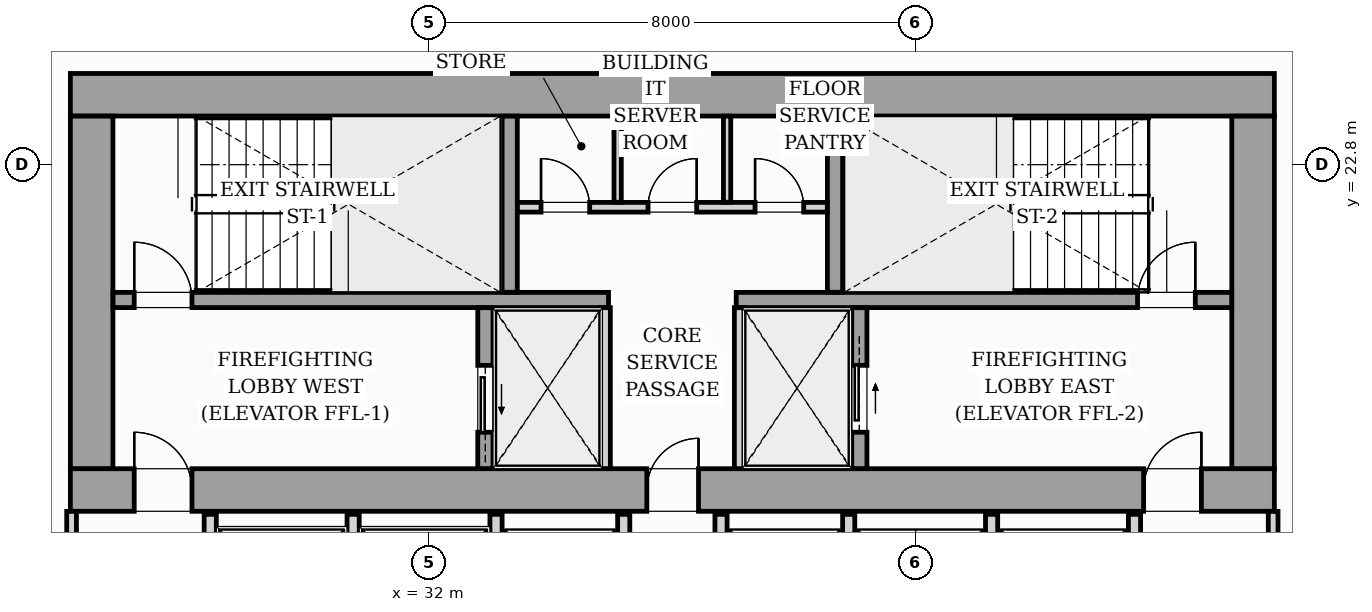
"""IFC4 building model, lengths in metres.
Left out: names, types, materials, properties, quantities, classifications, styles, units other than length and angle.
Written with IfcOpenShell. Run it as: python <this file> out.ifc"""

import sys

from ifc_helpers import new_model, si_unit, direction, frame, frame_2d, origin, origin_2d, place, context, subcontext, project, spatial, rectangle, i_section, extrude, source, transform, mapped, element, fill, save


model = new_model("IFC4")
c1 = context("Model", 3, precision=1e-05, world=origin(), true_north=direction((0.0, 1.0)))
c2 = subcontext(c1, "Body", "Model", "MODEL_VIEW")
j1 = project(units=[si_unit("LENGTHUNIT", "METRE"), si_unit("PLANEANGLEUNIT", "RADIAN")], contexts=[c1])
p1 = place(None, origin())
s1 = spatial("IfcSite", under=j1, at=p1, CompositionType="ELEMENT")
p2 = place(p1, origin())
s2 = spatial("IfcBuilding", under=s1, at=p2, CompositionType="ELEMENT")
p3 = place(p2, frame((0.0, 0.0, 84.2)))
s3 = spatial("IfcBuildingStorey", under=s2, at=p3, CompositionType="ELEMENT", Elevation=84.2)
m1 = source(origin(), c2, "Body", "SweptSolid", [
    extrude(i_section(OverallWidth=0.427, OverallDepth=0.483, WebThickness=0.051, FlangeThickness=0.082, FilletRadius=0.018, at=origin_2d()), origin(), (0.0, 0.0, 1.0), 3.196),
])
for number, where, z_axis, x_axis in (
    (1, (26.4, 17.4, 0.002), (0.0, 0.0, 1.0), (1.0, 0.0, 0.0)),
    (2, (33.12, 17.4, 0.002), (0.0, 0.0, 1.0), (1.0, 0.0, 0.0)),
    (3, (38.88, 17.4, 0.002), (0.0, 0.0, 1.0), (1.0, 0.0, 0.0)),
    (4, (45.6, 17.4, 0.002), (0.0, 0.0, 1.0), (1.0, 0.0, 0.0)),
    (5, (26.4, 24.0, 0.002), (0.0, 0.0, 1.0), (1.0, 0.0, 0.0)),
    (6, (33.12, 24.0, 0.002), (0.0, 0.0, 1.0), (1.0, 0.0, 0.0)),
    (7, (38.88, 24.0, 0.002), (0.0, 0.0, 1.0), (1.0, 0.0, 0.0)),
    (8, (45.6, 24.0, 0.002), (0.0, 0.0, 1.0), (1.0, 0.0, 0.0)),
):
    element("IfcColumn", number, at=place(p3, frame(where, z_axis=z_axis, x_axis=x_axis)), inside=s3, PredefinedType="PILASTER", context=c2, shape_type="MappedRepresentation", body=[
        mapped(m1, transform((0.0, 0.0, 0.0), scale=1.0)),
    ])
p4 = place(p3, frame((11.08, 23.508, 0.0), z_axis=(0.0, 0.0, 1.0), x_axis=(0.995396638587, 0.095841180552, 0.0)))
e9 = element("IfcWall", 9, at=p4, inside=s3, PredefinedType="STANDARD", context=c2, shape_type="SweptSolid", body=[
    extrude(rectangle(XDim=19.11, YDim=0.26, at=frame_2d((9.555, 0.0))), origin(), (0.0, 0.0, 1.0), 2.94),
])
p5 = place(p4, frame((7.824, 0.0, 0.0)))
e10 = element("IfcOpeningElement", 10, at=p5, cuts=e9, PredefinedType="OPENING", context=c2, shape_type="SweptSolid", body=[
    extrude(rectangle(XDim=1.8, YDim=2.06, at=frame_2d((0.9, 1.03))), frame((0.0, 0.14, 0.0), z_axis=(0.0, -1.0, 0.0), x_axis=(1.0, 0.0, 0.0)), (0.0, 0.0, 1.0), 0.28),
])
p6 = place(p4, frame((2.05, 0.0, 0.65)))
e11 = element("IfcOpeningElement", 11, at=p6, cuts=e9, PredefinedType="OPENING", context=c2, shape_type="SweptSolid", body=[
    extrude(rectangle(XDim=1.6, YDim=1.5, at=frame_2d((0.8, 0.75))), frame((0.0, 0.14, 0.0), z_axis=(0.0, -1.0, 0.0), x_axis=(1.0, 0.0, 0.0)), (0.0, 0.0, 1.0), 0.28),
])
p7 = place(p3, frame((26.1, 17.45, 0.0), z_axis=(0.0, 0.0, 1.0), x_axis=(1.0, 0.0, 0.0)))
e12 = element("IfcWall", 12, at=p7, inside=s3, PredefinedType="SHEAR", context=c2, shape_type="SweptSolid", body=[
    extrude(rectangle(XDim=19.8, YDim=0.7, at=frame_2d((9.9, 0.0))), origin(), (0.0, 0.0, 1.0), 3.2),
])
p8 = place(p7, frame((1.05, 0.0, 0.0)))
e13 = element("IfcOpeningElement", 13, at=p8, cuts=e12, PredefinedType="OPENING", context=c2, shape_type="SweptSolid", body=[
    extrude(rectangle(XDim=0.95, YDim=2.06, at=frame_2d((0.475, 1.03))), frame((0.0, 0.36, 0.0), z_axis=(0.0, -1.0, 0.0), x_axis=(1.0, 0.0, 0.0)), (0.0, 0.0, 1.0), 0.72),
])
p9 = place(p7, frame((9.48, 0.0, 0.0)))
e14 = element("IfcOpeningElement", 14, at=p9, cuts=e12, PredefinedType="OPENING", context=c2, shape_type="SweptSolid", body=[
    extrude(rectangle(XDim=0.85, YDim=2.0, at=frame_2d((0.425, 1.0))), frame((0.0, 0.36, 0.0), z_axis=(0.0, -1.0, 0.0), x_axis=(1.0, 0.0, 0.0)), (0.0, 0.0, 1.0), 0.72),
])
p10 = place(p7, frame((17.65, 0.0, 0.0)))
e15 = element("IfcOpeningElement", 15, at=p10, cuts=e12, PredefinedType="OPENING", context=c2, shape_type="SweptSolid", body=[
    extrude(rectangle(XDim=0.95, YDim=2.06, at=frame_2d((0.475, 1.03))), frame((0.0, 0.36, 0.0), z_axis=(0.0, -1.0, 0.0), x_axis=(1.0, 0.0, 0.0)), (0.0, 0.0, 1.0), 0.72),
])
p11 = place(p3, frame((26.1, 23.95, 0.0), z_axis=(0.0, 0.0, 1.0), x_axis=(1.0, 0.0, 0.0)))
e16 = element("IfcWall", 16, at=p11, inside=s3, PredefinedType="SHEAR", context=c2, shape_type="SweptSolid", body=[
    extrude(rectangle(XDim=19.8, YDim=0.7, at=frame_2d((9.9, 0.0))), origin(), (0.0, 0.0, 1.0), 3.2),
])
for number, where, z_axis, x_axis in (
    (17, (26.45, 17.802, 0.0), (0.0, 0.0, 1.0), (0.0, 1.0, 0.0)),
    (18, (45.55, 17.802, 0.0), (0.0, 0.0, 1.0), (0.0, 1.0, 0.0)),
):
    element("IfcWall", number, at=place(p3, frame(where, z_axis=z_axis, x_axis=x_axis)), inside=s3, PredefinedType="SHEAR", context=c2, shape_type="SweptSolid", body=[
        extrude(rectangle(XDim=5.796, YDim=0.7, at=frame_2d((2.898, 0.0))), origin(), (0.0, 0.0, 1.0), 3.2),
    ])
p12 = place(p3, frame((26.802, 20.575, 0.0), z_axis=(0.0, 0.0, 1.0), x_axis=(1.0, 0.0, 0.0)))
e19 = element("IfcWall", 19, at=p12, inside=s3, PredefinedType="SOLIDWALL", context=c2, shape_type="SweptSolid", body=[
    extrude(rectangle(XDim=8.148, YDim=0.25, at=frame_2d((4.074, 0.0))), origin(), (0.0, 0.0, 1.0), 3.2),
])
p13 = place(p12, frame((0.348, 0.0, 0.0)))
e20 = element("IfcOpeningElement", 20, at=p13, cuts=e19, PredefinedType="OPENING", context=c2, shape_type="SweptSolid", body=[
    extrude(rectangle(XDim=0.95, YDim=2.06, at=frame_2d((0.475, 1.03))), frame((0.0, 0.135, 0.0), z_axis=(0.0, -1.0, 0.0), x_axis=(1.0, 0.0, 0.0)), (0.0, 0.0, 1.0), 0.27),
])
p14 = place(p3, frame((37.05, 20.575, 0.0), z_axis=(0.0, 0.0, 1.0), x_axis=(1.0, 0.0, 0.0)))
e21 = element("IfcWall", 21, at=p14, inside=s3, PredefinedType="SOLIDWALL", context=c2, shape_type="SweptSolid", body=[
    extrude(rectangle(XDim=8.148, YDim=0.25, at=frame_2d((4.074, 0.0))), origin(), (0.0, 0.0, 1.0), 3.2),
])
p15 = place(p14, frame((6.6, 0.0, 0.0)))
e22 = element("IfcOpeningElement", 22, at=p15, cuts=e21, PredefinedType="OPENING", context=c2, shape_type="SweptSolid", body=[
    extrude(rectangle(XDim=0.95, YDim=2.06, at=frame_2d((0.475, 1.03))), frame((0.0, 0.135, 0.0), z_axis=(0.0, -1.0, 0.0), x_axis=(1.0, 0.0, 0.0)), (0.0, 0.0, 1.0), 0.27),
])
for number, where, z_axis, x_axis in (
    (23, (33.325, 20.702, 0.0), (0.0, 0.0, 1.0), (0.0, 1.0, 0.0)),
    (24, (38.675, 20.702, 0.0), (0.0, 0.0, 1.0), (0.0, 1.0, 0.0)),
):
    element("IfcWall", number, at=place(p3, frame(where, z_axis=z_axis, x_axis=x_axis)), inside=s3, PredefinedType="SOLIDWALL", context=c2, shape_type="SweptSolid", body=[
        extrude(rectangle(XDim=2.896, YDim=0.25, at=frame_2d((1.448, 0.0))), origin(), (0.0, 0.0, 1.0), 3.2),
    ])
p16 = place(p3, frame((32.925, 17.802, 0.0), z_axis=(0.0, 0.0, 1.0), x_axis=(0.0, 1.0, 0.0)))
e25 = element("IfcWall", 25, at=p16, inside=s3, PredefinedType="SOLIDWALL", context=c2, shape_type="SweptSolid", body=[
    extrude(rectangle(XDim=2.646, YDim=0.25, at=frame_2d((1.323, 0.0))), origin(), (0.0, 0.0, 1.0), 3.2),
])
p17 = place(p16, frame((0.598, 0.0, 0.0)))
e26 = element("IfcOpeningElement", 26, at=p17, cuts=e25, PredefinedType="OPENING", context=c2, shape_type="SweptSolid", body=[
    extrude(rectangle(XDim=1.1, YDim=2.08, at=frame_2d((0.55, 1.04))), frame((0.0, 0.135, 0.0), z_axis=(0.0, -1.0, 0.0), x_axis=(1.0, 0.0, 0.0)), (0.0, 0.0, 1.0), 0.27),
])
for number, where, z_axis, x_axis in (
    (27, (34.9, 17.802, 0.0), (0.0, 0.0, 1.0), (0.0, 1.0, 0.0)),
    (28, (37.1, 17.802, 0.0), (0.0, 0.0, 1.0), (0.0, 1.0, 0.0)),
):
    element("IfcWall", number, at=place(p3, frame(where, z_axis=z_axis, x_axis=x_axis)), inside=s3, PredefinedType="PARTITIONING", context=c2, shape_type="SweptSolid", body=[
        extrude(rectangle(XDim=2.646, YDim=0.16, at=frame_2d((1.323, 0.0))), origin(), (0.0, 0.0, 1.0), 2.94),
    ])
p18 = place(p3, frame((39.075, 17.802, 0.0), z_axis=(0.0, 0.0, 1.0), x_axis=(0.0, 1.0, 0.0)))
e29 = element("IfcWall", 29, at=p18, inside=s3, PredefinedType="SOLIDWALL", context=c2, shape_type="SweptSolid", body=[
    extrude(rectangle(XDim=2.646, YDim=0.25, at=frame_2d((1.323, 0.0))), origin(), (0.0, 0.0, 1.0), 3.2),
])
p19 = place(p18, frame((0.598, 0.0, 0.0)))
e30 = element("IfcOpeningElement", 30, at=p19, cuts=e29, PredefinedType="OPENING", context=c2, shape_type="SweptSolid", body=[
    extrude(rectangle(XDim=1.1, YDim=2.08, at=frame_2d((0.55, 1.04))), frame((0.0, 0.135, 0.0), z_axis=(0.0, -1.0, 0.0), x_axis=(1.0, 0.0, 0.0)), (0.0, 0.0, 1.0), 0.27),
])
p20 = place(p3, frame((33.452, 22.1, 0.0), z_axis=(0.0, 0.0, 1.0), x_axis=(1.0, 0.0, 0.0)))
e31 = element("IfcWall", 31, at=p20, inside=s3, PredefinedType="PARTITIONING", context=c2, shape_type="SweptSolid", body=[
    extrude(rectangle(XDim=5.096, YDim=0.16, at=frame_2d((2.548, 0.0))), origin(), (0.0, 0.0, 1.0), 2.94),
])
p21 = place(p20, frame((0.388, 0.0, 0.0)))
e32 = element("IfcOpeningElement", 32, at=p21, cuts=e31, PredefinedType="OPENING", context=c2, shape_type="SweptSolid", body=[
    extrude(rectangle(XDim=0.8, YDim=2.05, at=frame_2d((0.4, 1.025))), frame((0.0, 0.09, 0.0), z_axis=(0.0, -1.0, 0.0), x_axis=(1.0, 0.0, 0.0)), (0.0, 0.0, 1.0), 0.18),
])
p22 = place(p20, frame((2.148, 0.0, 0.0)))
e33 = element("IfcOpeningElement", 33, at=p22, cuts=e31, PredefinedType="OPENING", context=c2, shape_type="SweptSolid", body=[
    extrude(rectangle(XDim=0.8, YDim=2.05, at=frame_2d((0.4, 1.025))), frame((0.0, 0.09, 0.0), z_axis=(0.0, -1.0, 0.0), x_axis=(1.0, 0.0, 0.0)), (0.0, 0.0, 1.0), 0.18),
])
p23 = place(p20, frame((3.908, 0.0, 0.0)))
e34 = element("IfcOpeningElement", 34, at=p23, cuts=e31, PredefinedType="OPENING", context=c2, shape_type="SweptSolid", body=[
    extrude(rectangle(XDim=0.8, YDim=2.05, at=frame_2d((0.4, 1.025))), frame((0.0, 0.09, 0.0), z_axis=(0.0, -1.0, 0.0), x_axis=(1.0, 0.0, 0.0)), (0.0, 0.0, 1.0), 0.18),
])
for number, where, z_axis, x_axis in (
    (35, (35.1, 22.182, 0.0), (0.0, 0.0, 1.0), (0.0, 1.0, 0.0)),
    (36, (36.9, 22.182, 0.0), (0.0, 0.0, 1.0), (0.0, 1.0, 0.0)),
):
    element("IfcWall", number, at=place(p3, frame(where, z_axis=z_axis, x_axis=x_axis)), inside=s3, PredefinedType="PARTITIONING", context=c2, shape_type="SweptSolid", body=[
        extrude(rectangle(XDim=1.416, YDim=0.12, at=frame_2d((0.708, 0.0))), origin(), (0.0, 0.0, 1.0), 2.94),
    ])
for number, where, z_axis, x_axis in (
    (37, (28.4, 14.75, 0.0), (0.0, 0.0, 1.0), (0.0, 1.0, 0.0)),
    (38, (30.75, 14.75, 0.0), (0.0, 0.0, 1.0), (0.0, 1.0, 0.0)),
    (39, (33.1, 14.75, 0.0), (0.0, 0.0, 1.0), (0.0, 1.0, 0.0)),
    (40, (35.2, 14.75, 0.0), (0.0, 0.0, 1.0), (0.0, 1.0, 0.0)),
    (41, (36.8, 14.75, 0.0), (0.0, 0.0, 1.0), (0.0, 1.0, 0.0)),
    (42, (38.9, 14.75, 0.0), (0.0, 0.0, 1.0), (0.0, 1.0, 0.0)),
    (43, (41.25, 14.75, 0.0), (0.0, 0.0, 1.0), (0.0, 1.0, 0.0)),
    (44, (43.6, 14.75, 0.0), (0.0, 0.0, 1.0), (0.0, 1.0, 0.0)),
):
    element("IfcWall", number, at=place(p3, frame(where, z_axis=z_axis, x_axis=x_axis)), inside=s3, PredefinedType="PARTITIONING", context=c2, shape_type="SweptSolid", body=[
        extrude(rectangle(XDim=2.3, YDim=0.2, at=frame_2d((1.15, 0.0))), origin(), (0.0, 0.0, 1.0), 2.94),
    ])
p24 = place(p3, frame((36.0, 24.302, 0.0), z_axis=(0.0, 0.0, 1.0), x_axis=(0.0, 1.0, 0.0)))
e45 = element("IfcWall", 45, at=p24, inside=s3, PredefinedType="PARTITIONING", context=c2, shape_type="SweptSolid", body=[
    extrude(rectangle(XDim=1.656, YDim=0.2, at=frame_2d((0.828, 0.0))), origin(), (0.0, 0.0, 1.0), 2.94),
])
for number, where, z_axis, x_axis in (
    (46, (26.12, 14.762, 0.0), (0.0, 0.0, 1.0), (0.0, 1.0, 0.0)),
    (47, (45.88, 14.762, 0.0), (0.0, 0.0, 1.0), (0.0, 1.0, 0.0)),
):
    element("IfcWall", number, at=place(p3, frame(where, z_axis=z_axis, x_axis=x_axis)), inside=s3, PredefinedType="PARTITIONING", context=c2, shape_type="SweptSolid", body=[
        extrude(rectangle(XDim=2.336, YDim=0.16, at=frame_2d((1.168, 0.0))), origin(), (0.0, 0.0, 1.0), 2.94),
    ])
m2 = source(origin(), c2, "Body", "SweptSolid", [
    extrude(rectangle(XDim=0.95, YDim=2.06, at=frame_2d((0.475, 1.03))), frame((0.0, 0.025, 0.0), z_axis=(0.0, -1.0, 0.0), x_axis=(1.0, 0.0, 0.0)), (0.0, 0.0, 1.0), 0.05),
])
p25 = place(p8, origin())
e48 = element("IfcDoor", 48, at=p25, inside=s3, OperationType="SINGLE_SWING_LEFT", PredefinedType="DOOR", context=c2, shape_type="MappedRepresentation", body=[
    mapped(m2, transform((0.0, 0.0, 0.0), scale=1.0)),
])
fill(e13, e48)
m3 = source(origin(), c2, "Body", "SweptSolid", [
    extrude(rectangle(XDim=0.85, YDim=2.0, at=frame_2d((0.425, 1.0))), frame((0.0, 0.025, 0.0), z_axis=(0.0, -1.0, 0.0), x_axis=(1.0, 0.0, 0.0)), (0.0, 0.0, 1.0), 0.05),
])
p26 = place(p9, origin())
e49 = element("IfcDoor", 49, at=p26, inside=s3, OperationType="SINGLE_SWING_RIGHT", PredefinedType="DOOR", context=c2, shape_type="MappedRepresentation", body=[
    mapped(m3, transform((0.0, 0.0, 0.0), scale=1.0)),
])
fill(e14, e49)
p27 = place(p10, origin())
e50 = element("IfcDoor", 50, at=p27, inside=s3, OperationType="SINGLE_SWING_RIGHT", PredefinedType="DOOR", context=c2, shape_type="MappedRepresentation", body=[
    mapped(m2, transform((0.0, 0.0, 0.0), scale=1.0)),
])
fill(e15, e50)
p28 = place(p13, origin())
e51 = element("IfcDoor", 51, at=p28, inside=s3, OperationType="SINGLE_SWING_LEFT", PredefinedType="DOOR", context=c2, shape_type="MappedRepresentation", body=[
    mapped(m2, transform((0.0, 0.0, 0.0), scale=1.0)),
])
fill(e20, e51)
p29 = place(p15, origin())
e52 = element("IfcDoor", 52, at=p29, inside=s3, OperationType="SINGLE_SWING_RIGHT", PredefinedType="DOOR", context=c2, shape_type="MappedRepresentation", body=[
    mapped(m2, transform((0.0, 0.0, 0.0), scale=1.0)),
])
fill(e22, e52)
m4 = source(origin(), c2, "Body", "SweptSolid", [
    extrude(rectangle(XDim=1.1, YDim=2.08, at=frame_2d((0.55, 1.04))), frame((0.0, 0.025, 0.0), z_axis=(0.0, -1.0, 0.0), x_axis=(1.0, 0.0, 0.0)), (0.0, 0.0, 1.0), 0.05),
])
p30 = place(p17, origin())
e53 = element("IfcDoor", 53, at=p30, inside=s3, OperationType="SLIDING_TO_LEFT", PredefinedType="DOOR", context=c2, shape_type="MappedRepresentation", body=[
    mapped(m4, transform((0.0, 0.0, 0.0), scale=1.0)),
])
fill(e26, e53)
p31 = place(p19, origin())
e54 = element("IfcDoor", 54, at=p31, inside=s3, OperationType="SLIDING_TO_RIGHT", PredefinedType="DOOR", context=c2, shape_type="MappedRepresentation", body=[
    mapped(m4, transform((0.0, 0.0, 0.0), scale=1.0)),
])
fill(e30, e54)
m5 = source(origin(), c2, "Body", "SweptSolid", [
    extrude(rectangle(XDim=0.8, YDim=2.05, at=frame_2d((0.4, 1.025))), frame((0.0, 0.025, 0.0), z_axis=(0.0, -1.0, 0.0), x_axis=(1.0, 0.0, 0.0)), (0.0, 0.0, 1.0), 0.05),
])
p32 = place(p21, origin())
e55 = element("IfcDoor", 55, at=p32, inside=s3, OperationType="SINGLE_SWING_LEFT", PredefinedType="DOOR", context=c2, shape_type="MappedRepresentation", body=[
    mapped(m5, transform((0.0, 0.0, 0.0), scale=1.0)),
])
fill(e32, e55)
p33 = place(p22, origin())
e56 = element("IfcDoor", 56, at=p33, inside=s3, OperationType="SINGLE_SWING_RIGHT", PredefinedType="DOOR", context=c2, shape_type="MappedRepresentation", body=[
    mapped(m5, transform((0.0, 0.0, 0.0), scale=1.0)),
])
fill(e33, e56)
p34 = place(p23, origin())
e57 = element("IfcDoor", 57, at=p34, inside=s3, OperationType="SINGLE_SWING_LEFT", PredefinedType="DOOR", context=c2, shape_type="MappedRepresentation", body=[
    mapped(m5, transform((0.0, 0.0, 0.0), scale=1.0)),
])
fill(e34, e57)
save(model, sys.argv[1])
